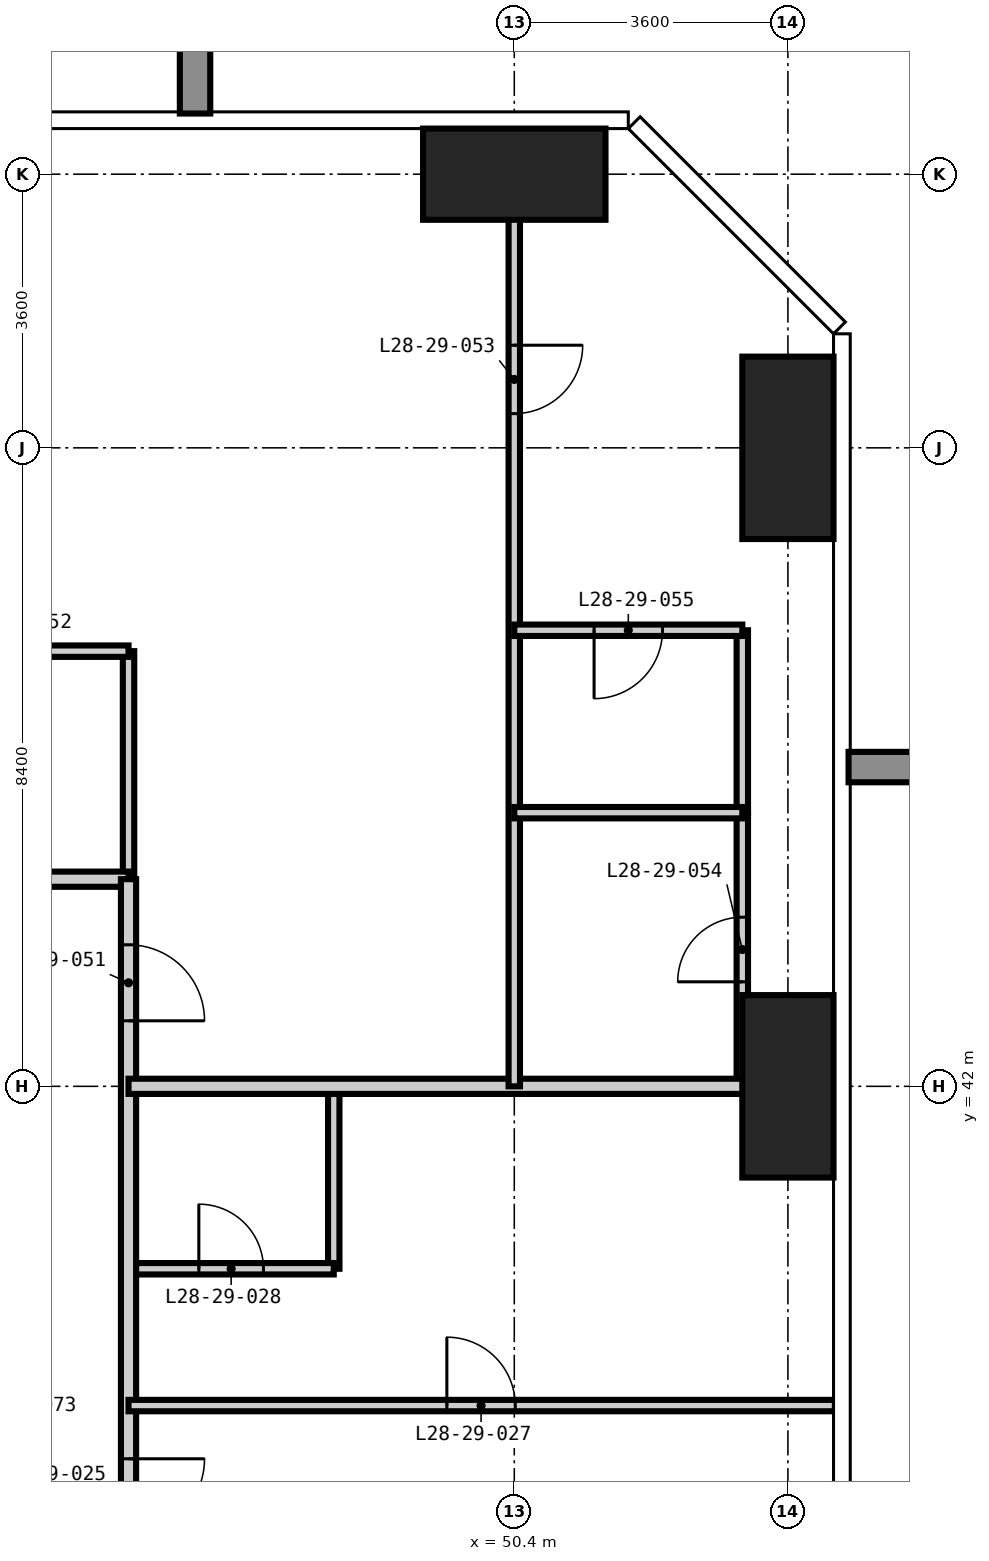
"""IFC4 building model, lengths in metres.
Left out: names, types, materials, properties, quantities, classifications, styles, units other than length and angle.
Written with IfcOpenShell. Run it as: python <this file> out.ifc"""

import sys

from ifc_helpers import new_model, si_unit, direction, frame, frame_2d, origin, origin_2d, place, context, subcontext, project, spatial, rectangle, extrude, element, fill, save


model = new_model("IFC4")
c1 = context("Model", 3, precision=1e-05, world=origin(), true_north=direction((0.0, 1.0)))
c2 = subcontext(c1, "Body", "Model", "MODEL_VIEW")
j1 = project(units=[si_unit("LENGTHUNIT", "METRE"), si_unit("PLANEANGLEUNIT", "RADIAN")], contexts=[c1])
p1 = place(None, origin())
s1 = spatial("IfcSite", under=j1, at=p1, CompositionType="ELEMENT")
p2 = place(p1, origin())
s2 = spatial("IfcBuilding", under=s1, at=p2, CompositionType="ELEMENT")
p3 = place(p2, frame((0.0, 0.0, 111.6)))
s3 = spatial("IfcBuildingStorey", under=s2, at=p3, CompositionType="ELEMENT", Elevation=111.6)
p4 = place(p3, frame((50.4, 54.0, -0.35), z_axis=(0.0, 0.0, 1.0), x_axis=(1.0, 0.0, 0.0)))
e1 = element("IfcColumn", 1, at=p4, inside=s3, PredefinedType="COLUMN", context=c2, shape_type="SweptSolid", body=[
    extrude(rectangle(XDim=2.4, YDim=1.2, at=origin_2d()), origin(), (0.0, 0.0, 1.0), 3.6),
])
for number, where, z_axis, x_axis in (
    (2, (54.0, 42.0, -0.35), (0.0, 0.0, 1.0), (1.0, 0.0, 0.0)),
    (3, (54.0, 50.4, -0.35), (0.0, 0.0, 1.0), (1.0, 0.0, 0.0)),
):
    element("IfcColumn", number, at=place(p3, frame(where, z_axis=z_axis, x_axis=x_axis)), inside=s3, PredefinedType="COLUMN", context=c2, shape_type="SweptSolid", body=[
        extrude(rectangle(XDim=1.2, YDim=2.4, at=origin_2d()), origin(), (0.0, 0.0, 1.0), 3.6),
    ])
p5 = place(p3, frame((45.325, 44.725, 0.0), z_axis=(0.0, 0.0, 1.0), x_axis=(0.0, 1.0, 0.0)))
e4 = element("IfcWall", 4, at=p5, inside=s3, PredefinedType="PARTITIONING", context=c2, shape_type="SweptSolid", body=[
    extrude(rectangle(XDim=3.0, YDim=0.15, at=frame_2d((1.5, 0.0))), origin(), (0.0, 0.0, 1.0), 3.25),
])
p6 = place(p3, frame((48.025, 39.6, 0.0), z_axis=(0.0, 0.0, 1.0), x_axis=(0.0, 1.0, 0.0)))
e5 = element("IfcWall", 5, at=p6, inside=s3, PredefinedType="PARTITIONING", context=c2, shape_type="SweptSolid", body=[
    extrude(rectangle(XDim=2.4, YDim=0.15, at=frame_2d((1.2, 0.0))), origin(), (0.0, 0.0, 1.0), 3.25),
])
p7 = place(p3, frame((53.4, 42.0, 0.0), z_axis=(0.0, 0.0, 1.0), x_axis=(0.0, 1.0, 0.0)))
e6 = element("IfcWall", 6, at=p7, inside=s3, PredefinedType="PARTITIONING", context=c2, shape_type="SweptSolid", body=[
    extrude(rectangle(XDim=3.6, YDim=0.15, at=frame_2d((1.8, 0.0))), origin(), (0.0, 0.0, 1.0), 3.25),
])
p8 = place(p7, frame((1.375, 0.0, 0.0)))
e7 = element("IfcOpeningElement", 7, at=p8, cuts=e6, PredefinedType="OPENING", context=c2, shape_type="SweptSolid", body=[
    extrude(rectangle(XDim=0.85, YDim=2.1, at=frame_2d((0.425, 1.05))), frame((0.0, 0.085, 0.0), z_axis=(0.0, -1.0, 0.0), x_axis=(1.0, 0.0, 0.0)), (0.0, 0.0, 1.0), 0.17),
])
p9 = place(p3, frame((45.325, 39.6, 0.0), z_axis=(0.0, 0.0, 1.0), x_axis=(1.0, 0.0, 0.0)))
e8 = element("IfcWall", 8, at=p9, inside=s3, PredefinedType="PARTITIONING", context=c2, shape_type="SweptSolid", body=[
    extrude(rectangle(XDim=2.7, YDim=0.15, at=frame_2d((1.35, 0.0))), origin(), (0.0, 0.0, 1.0), 3.25),
])
p10 = place(p9, frame((0.925, 0.0, 0.0)))
e9 = element("IfcOpeningElement", 9, at=p10, cuts=e8, PredefinedType="OPENING", context=c2, shape_type="SweptSolid", body=[
    extrude(rectangle(XDim=0.85, YDim=2.1, at=frame_2d((0.425, 1.05))), frame((0.0, 0.085, 0.0), z_axis=(0.0, -1.0, 0.0), x_axis=(1.0, 0.0, 0.0)), (0.0, 0.0, 1.0), 0.17),
])
p11 = place(p3, frame((42.0, 47.725, 0.0), z_axis=(0.0, 0.0, 1.0), x_axis=(1.0, 0.0, 0.0)))
e10 = element("IfcWall", 10, at=p11, inside=s3, PredefinedType="PARTITIONING", context=c2, shape_type="SweptSolid", body=[
    extrude(rectangle(XDim=3.325, YDim=0.15, at=frame_2d((1.663, 0.0))), origin(), (0.0, 0.0, 1.0), 3.25),
])
p12 = place(p11, frame((1.238, 0.0, 0.0)))
e11 = element("IfcOpeningElement", 11, at=p12, cuts=e10, PredefinedType="OPENING", context=c2, shape_type="SweptSolid", body=[
    extrude(rectangle(XDim=0.85, YDim=2.1, at=frame_2d((0.425, 1.05))), frame((0.0, 0.085, 0.0), z_axis=(0.0, -1.0, 0.0), x_axis=(1.0, 0.0, 0.0)), (0.0, 0.0, 1.0), 0.17),
])
p13 = place(p3, frame((12.6, 44.725, 0.0), z_axis=(0.0, 0.0, 1.0), x_axis=(1.0, 0.0, 0.0)))
e12 = element("IfcWall", 12, at=p13, inside=s3, PredefinedType="PARTITIONING", context=c2, shape_type="SweptSolid", body=[
    extrude(rectangle(XDim=32.725, YDim=0.2, at=frame_2d((16.362, 0.0))), origin(), (0.0, 0.0, 1.0), 3.25),
])
p14 = place(p13, frame((9.1, 0.0, 0.0)))
e13 = element("IfcOpeningElement", 13, at=p14, cuts=e12, PredefinedType="OPENING", context=c2, shape_type="SweptSolid", body=[
    extrude(rectangle(XDim=1.0, YDim=2.2, at=frame_2d((0.5, 1.1))), frame((0.0, 0.11, 0.0), z_axis=(0.0, -1.0, 0.0), x_axis=(1.0, 0.0, 0.0)), (0.0, 0.0, 1.0), 0.22),
])
p15 = place(p13, frame((17.5, 0.0, 0.0)))
e14 = element("IfcOpeningElement", 14, at=p15, cuts=e12, PredefinedType="OPENING", context=c2, shape_type="SweptSolid", body=[
    extrude(rectangle(XDim=1.0, YDim=2.2, at=frame_2d((0.5, 1.1))), frame((0.0, 0.11, 0.0), z_axis=(0.0, -1.0, 0.0), x_axis=(1.0, 0.0, 0.0)), (0.0, 0.0, 1.0), 0.22),
])
p16 = place(p13, frame((25.9, 0.0, 0.0)))
e15 = element("IfcOpeningElement", 15, at=p16, cuts=e12, PredefinedType="OPENING", context=c2, shape_type="SweptSolid", body=[
    extrude(rectangle(XDim=1.0, YDim=2.2, at=frame_2d((0.5, 1.1))), frame((0.0, 0.11, 0.0), z_axis=(0.0, -1.0, 0.0), x_axis=(1.0, 0.0, 0.0)), (0.0, 0.0, 1.0), 0.22),
])
p17 = place(p3, frame((45.325, 44.725, 0.0), z_axis=(0.0, 0.0, 1.0), x_axis=(0.0, -1.0, 0.0)))
e16 = element("IfcWall", 16, at=p17, inside=s3, PredefinedType="PARTITIONING", context=c2, shape_type="SweptSolid", body=[
    extrude(rectangle(XDim=31.85, YDim=0.2, at=frame_2d((15.925, 0.0))), origin(), (0.0, 0.0, 1.0), 3.25),
])
p18 = place(p17, frame((24.425, 0.0, 0.0)))
e17 = element("IfcOpeningElement", 17, at=p18, cuts=e16, PredefinedType="OPENING", context=c2, shape_type="SweptSolid", body=[
    extrude(rectangle(XDim=1.0, YDim=2.2, at=frame_2d((0.5, 1.1))), frame((0.0, 0.11, 0.0), z_axis=(0.0, -1.0, 0.0), x_axis=(1.0, 0.0, 0.0)), (0.0, 0.0, 1.0), 0.22),
])
p19 = place(p17, frame((16.025, 0.0, 0.0)))
e18 = element("IfcOpeningElement", 18, at=p19, cuts=e16, PredefinedType="OPENING", context=c2, shape_type="SweptSolid", body=[
    extrude(rectangle(XDim=1.0, YDim=2.2, at=frame_2d((0.5, 1.1))), frame((0.0, 0.11, 0.0), z_axis=(0.0, -1.0, 0.0), x_axis=(1.0, 0.0, 0.0)), (0.0, 0.0, 1.0), 0.22),
])
p20 = place(p17, frame((7.625, 0.0, 0.0)))
e19 = element("IfcOpeningElement", 19, at=p20, cuts=e16, PredefinedType="OPENING", context=c2, shape_type="SweptSolid", body=[
    extrude(rectangle(XDim=1.0, YDim=2.2, at=frame_2d((0.5, 1.1))), frame((0.0, 0.11, 0.0), z_axis=(0.0, -1.0, 0.0), x_axis=(1.0, 0.0, 0.0)), (0.0, 0.0, 1.0), 0.22),
])
p21 = place(p17, frame((29.387, 0.0, 0.0)))
e20 = element("IfcOpeningElement", 20, at=p21, cuts=e16, PredefinedType="OPENING", context=c2, shape_type="SweptSolid", body=[
    extrude(rectangle(XDim=1.0, YDim=2.2, at=frame_2d((0.5, 1.1))), frame((0.0, 0.11, 0.0), z_axis=(0.0, -1.0, 0.0), x_axis=(1.0, 0.0, 0.0)), (0.0, 0.0, 1.0), 0.22),
])
p22 = place(p17, frame((0.863, 0.0, 0.0)))
e21 = element("IfcOpeningElement", 21, at=p22, cuts=e16, PredefinedType="OPENING", context=c2, shape_type="SweptSolid", body=[
    extrude(rectangle(XDim=1.0, YDim=2.2, at=frame_2d((0.5, 1.1))), frame((0.0, 0.11, 0.0), z_axis=(0.0, -1.0, 0.0), x_axis=(1.0, 0.0, 0.0)), (0.0, 0.0, 1.0), 0.22),
])
p23 = place(p3, frame((45.325, 42.0, 0.0), z_axis=(0.0, 0.0, 1.0), x_axis=(1.0, 0.0, 0.0)))
e22 = element("IfcWall", 22, at=p23, inside=s3, PredefinedType="PARTITIONING", context=c2, shape_type="SweptSolid", body=[
    extrude(rectangle(XDim=9.293, YDim=0.2, at=frame_2d((4.646, 0.0))), origin(), (0.0, 0.0, 1.0), 3.25),
])
p24 = place(p3, frame((50.4, 42.0, 0.0), z_axis=(0.0, 0.0, 1.0), x_axis=(0.0, 1.0, 0.0)))
e23 = element("IfcWall", 23, at=p24, inside=s3, PredefinedType="PARTITIONING", context=c2, shape_type="SweptSolid", body=[
    extrude(rectangle(XDim=12.618, YDim=0.15, at=frame_2d((6.309, 0.0))), origin(), (0.0, 0.0, 1.0), 3.25),
])
p25 = place(p24, frame((8.85, 0.0, 0.0)))
e24 = element("IfcOpeningElement", 24, at=p25, cuts=e23, PredefinedType="OPENING", context=c2, shape_type="SweptSolid", body=[
    extrude(rectangle(XDim=0.9, YDim=2.1, at=frame_2d((0.45, 1.05))), frame((0.0, 0.085, 0.0), z_axis=(0.0, -1.0, 0.0), x_axis=(1.0, 0.0, 0.0)), (0.0, 0.0, 1.0), 0.17),
])
p26 = place(p3, frame((53.4, 45.6, 0.0), z_axis=(0.0, 0.0, 1.0), x_axis=(0.0, 1.0, 0.0)))
e25 = element("IfcWall", 25, at=p26, inside=s3, PredefinedType="PARTITIONING", context=c2, shape_type="SweptSolid", body=[
    extrude(rectangle(XDim=2.4, YDim=0.15, at=frame_2d((1.2, 0.0))), origin(), (0.0, 0.0, 1.0), 3.25),
])
p27 = place(p3, frame((45.325, 37.8, 0.0), z_axis=(0.0, 0.0, 1.0), x_axis=(1.0, 0.0, 0.0)))
e26 = element("IfcWall", 26, at=p27, inside=s3, PredefinedType="PARTITIONING", context=c2, shape_type="SweptSolid", body=[
    extrude(rectangle(XDim=9.293, YDim=0.15, at=frame_2d((4.646, 0.0))), origin(), (0.0, 0.0, 1.0), 3.25),
])
p28 = place(p27, frame((4.188, 0.0, 0.0)))
e27 = element("IfcOpeningElement", 27, at=p28, cuts=e26, PredefinedType="OPENING", context=c2, shape_type="SweptSolid", body=[
    extrude(rectangle(XDim=0.9, YDim=2.1, at=frame_2d((0.45, 1.05))), frame((0.0, 0.085, 0.0), z_axis=(0.0, -1.0, 0.0), x_axis=(1.0, 0.0, 0.0)), (0.0, 0.0, 1.0), 0.17),
])
p29 = place(p3, frame((50.4, 45.6, 0.0), z_axis=(0.0, 0.0, 1.0), x_axis=(1.0, 0.0, 0.0)))
e28 = element("IfcWall", 28, at=p29, inside=s3, PredefinedType="PARTITIONING", context=c2, shape_type="SweptSolid", body=[
    extrude(rectangle(XDim=3.0, YDim=0.15, at=frame_2d((1.5, 0.0))), origin(), (0.0, 0.0, 1.0), 3.25),
])
p30 = place(p3, frame((50.4, 48.0, 0.0), z_axis=(0.0, 0.0, 1.0), x_axis=(1.0, 0.0, 0.0)))
e29 = element("IfcWall", 29, at=p30, inside=s3, PredefinedType="PARTITIONING", context=c2, shape_type="SweptSolid", body=[
    extrude(rectangle(XDim=3.0, YDim=0.15, at=frame_2d((1.5, 0.0))), origin(), (0.0, 0.0, 1.0), 3.25),
])
p31 = place(p30, frame((1.05, 0.0, 0.0)))
e30 = element("IfcOpeningElement", 30, at=p31, cuts=e29, PredefinedType="OPENING", context=c2, shape_type="SweptSolid", body=[
    extrude(rectangle(XDim=0.9, YDim=2.1, at=frame_2d((0.45, 1.05))), frame((0.0, 0.085, 0.0), z_axis=(0.0, -1.0, 0.0), x_axis=(1.0, 0.0, 0.0)), (0.0, 0.0, 1.0), 0.17),
])
p32 = place(p20, origin())
e31 = element("IfcDoor", 31, at=p32, inside=s3, OperationType="SINGLE_SWING_LEFT", PredefinedType="DOOR", context=c2, shape_type="SweptSolid", body=[
    extrude(rectangle(XDim=1.0, YDim=2.2, at=frame_2d((0.5, 1.1))), frame((0.0, 0.025, 0.0), z_axis=(0.0, -1.0, 0.0), x_axis=(1.0, 0.0, 0.0)), (0.0, 0.0, 1.0), 0.05),
])
fill(e19, e31)
p33 = place(p28, origin())
e32 = element("IfcDoor", 32, at=p33, inside=s3, OperationType="SINGLE_SWING_LEFT", PredefinedType="DOOR", context=c2, shape_type="SweptSolid", body=[
    extrude(rectangle(XDim=0.9, YDim=2.1, at=frame_2d((0.45, 1.05))), frame((0.0, 0.025, 0.0), z_axis=(0.0, -1.0, 0.0), x_axis=(1.0, 0.0, 0.0)), (0.0, 0.0, 1.0), 0.05),
])
fill(e27, e32)
p34 = place(p10, origin())
e33 = element("IfcDoor", 33, at=p34, inside=s3, OperationType="SINGLE_SWING_LEFT", PredefinedType="DOOR", context=c2, shape_type="SweptSolid", body=[
    extrude(rectangle(XDim=0.85, YDim=2.1, at=frame_2d((0.425, 1.05))), frame((0.0, 0.025, 0.0), z_axis=(0.0, -1.0, 0.0), x_axis=(1.0, 0.0, 0.0)), (0.0, 0.0, 1.0), 0.05),
])
fill(e9, e33)
p35 = place(p22, origin())
e34 = element("IfcDoor", 34, at=p35, inside=s3, OperationType="SINGLE_SWING_RIGHT", PredefinedType="DOOR", context=c2, shape_type="SweptSolid", body=[
    extrude(rectangle(XDim=1.0, YDim=2.2, at=frame_2d((0.5, 1.1))), frame((0.0, 0.025, 0.0), z_axis=(0.0, -1.0, 0.0), x_axis=(1.0, 0.0, 0.0)), (0.0, 0.0, 1.0), 0.05),
])
fill(e21, e34)
p36 = place(p25, frame((0.9, 0.0, 0.0), z_axis=(0.0, 0.0, 1.0), x_axis=(-1.0, 0.0, 0.0)))
e35 = element("IfcDoor", 35, at=p36, inside=s3, OperationType="SINGLE_SWING_LEFT", PredefinedType="DOOR", context=c2, shape_type="SweptSolid", body=[
    extrude(rectangle(XDim=0.9, YDim=2.1, at=frame_2d((0.45, 1.05))), frame((0.0, 0.025, 0.0), z_axis=(0.0, -1.0, 0.0), x_axis=(1.0, 0.0, 0.0)), (0.0, 0.0, 1.0), 0.05),
])
fill(e24, e35)
p37 = place(p8, origin())
e36 = element("IfcDoor", 36, at=p37, inside=s3, OperationType="SINGLE_SWING_LEFT", PredefinedType="DOOR", context=c2, shape_type="SweptSolid", body=[
    extrude(rectangle(XDim=0.85, YDim=2.1, at=frame_2d((0.425, 1.05))), frame((0.0, 0.025, 0.0), z_axis=(0.0, -1.0, 0.0), x_axis=(1.0, 0.0, 0.0)), (0.0, 0.0, 1.0), 0.05),
])
fill(e7, e36)
p38 = place(p31, frame((0.9, 0.0, 0.0), z_axis=(0.0, 0.0, 1.0), x_axis=(-1.0, 0.0, 0.0)))
e37 = element("IfcDoor", 37, at=p38, inside=s3, OperationType="SINGLE_SWING_RIGHT", PredefinedType="DOOR", context=c2, shape_type="SweptSolid", body=[
    extrude(rectangle(XDim=0.9, YDim=2.1, at=frame_2d((0.45, 1.05))), frame((0.0, 0.025, 0.0), z_axis=(0.0, -1.0, 0.0), x_axis=(1.0, 0.0, 0.0)), (0.0, 0.0, 1.0), 0.05),
])
fill(e30, e37)
save(model, sys.argv[1])
